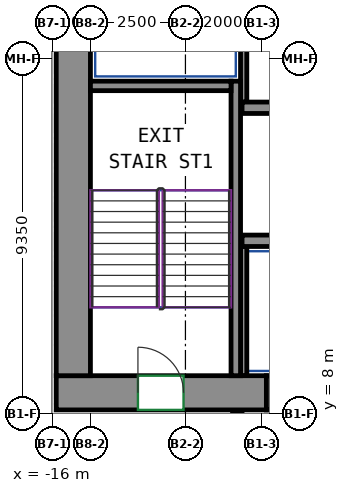
"""IFC4 building model, lengths in metres.
Left out: names, types, materials, properties, quantities, classifications, styles, units other than length and angle.
Written with IfcOpenShell. Run it as: python <this file> out.ifc"""

import sys

from ifc_helpers import new_model, si_unit, direction, frame, frame_2d, origin, place, context, subcontext, project, spatial, rectangle, extrude, source, transform, mapped, element, fill, save


model = new_model("IFC4")
c1 = context("Model", 3, precision=1e-05, world=origin(), true_north=direction((0.0, 1.0)))
c2 = subcontext(c1, "Body", "Model", "MODEL_VIEW")
j1 = project(units=[si_unit("LENGTHUNIT", "METRE"), si_unit("PLANEANGLEUNIT", "RADIAN")], contexts=[c1])
p1 = place(None, origin())
s1 = spatial("IfcSite", under=j1, at=p1, CompositionType="ELEMENT")
p2 = place(p1, origin())
s2 = spatial("IfcBuilding", under=s1, at=p2, CompositionType="ELEMENT")
p3 = place(p2, frame((0.0, 0.0, 120.6)))
s3 = spatial("IfcBuildingStorey", under=s2, at=p3, CompositionType="ELEMENT", Elevation=120.6)
m1 = source(origin(), c2, "Body", "SweptSolid", [
    extrude(rectangle(XDim=5.53, YDim=0.9, at=frame_2d((2.765, 0.0))), origin(), (0.0, 0.0, 1.0), 3.72),
])
p4 = place(p3, frame((-15.9, 8.55, 0.0), z_axis=(0.0, 0.0, 1.0), x_axis=(1.0, 0.0, 0.0)))
e1 = element("IfcWall", 1, at=p4, inside=s3, PredefinedType="SHEAR", context=c2, shape_type="MappedRepresentation", body=[
    mapped(m1, transform((0.0, 0.0, 0.0))),
])
p5 = place(p4, frame((2.15, 0.0, 0.0)))
e2 = element("IfcOpeningElement", 2, at=p5, cuts=e1, PredefinedType="OPENING", context=c2, shape_type="SweptSolid", body=[
    extrude(rectangle(XDim=1.2, YDim=2.1, at=frame_2d((0.6, 1.05))), frame((0.0, 0.46, 0.0), z_axis=(0.0, -1.0, 0.0), x_axis=(1.0, 0.0, 0.0)), (0.0, 0.0, 1.0), 0.92),
])
m2 = source(origin(), c2, "Body", "SweptSolid", [
    extrude(rectangle(XDim=12.0, YDim=0.9, at=frame_2d((6.0, 0.0))), origin(), (0.0, 0.0, 1.0), 3.72),
])
p6 = place(p3, frame((-15.45, 9.0, 0.0), z_axis=(0.0, 0.0, 1.0), x_axis=(0.0, 1.0, 0.0)))
e3 = element("IfcWall", 3, at=p6, inside=s3, PredefinedType="SHEAR", context=c2, shape_type="MappedRepresentation", body=[
    mapped(m2, transform((0.0, 0.0, 0.0))),
])
m3 = source(origin(), c2, "Body", "SweptSolid", [
    extrude(rectangle(XDim=7.75, YDim=0.25, at=frame_2d((3.875, 0.0))), origin(), (0.0, 0.0, 1.0), 3.72),
])
p7 = place(p3, frame((-11.175, 9.0, 0.0), z_axis=(0.0, 0.0, 1.0), x_axis=(0.0, 1.0, 0.0)))
e4 = element("IfcWall", 4, at=p7, inside=s3, PredefinedType="SHEAR", context=c2, shape_type="MappedRepresentation", body=[
    mapped(m3, transform((0.0, 0.0, 0.0))),
])
m4 = source(origin(), c2, "Body", "SweptSolid", [
    extrude(rectangle(XDim=3.7, YDim=0.25, at=frame_2d((1.85, 0.0))), origin(), (0.0, 0.0, 1.0), 3.72),
])
p8 = place(p3, frame((-15.0, 16.625, 0.0), z_axis=(0.0, 0.0, 1.0), x_axis=(1.0, 0.0, 0.0)))
e5 = element("IfcWall", 5, at=p8, inside=s3, PredefinedType="SHEAR", context=c2, shape_type="MappedRepresentation", body=[
    mapped(m4, transform((0.0, 0.0, 0.0))),
])
m5 = source(origin(), c2, "Body", "SweptSolid", [
    extrude(rectangle(XDim=6.0, YDim=0.3, at=frame_2d((3.0, 0.0))), origin(), (0.0, 0.0, 1.0), 3.72),
])
for number, where, z_axis, x_axis in (
    (6, (-11.01, 12.55, 0.0), (0.0, 0.0, 1.0), (1.0, 0.0, 0.0)),
    (7, (-11.01, 16.05, 0.0), (0.0, 0.0, 1.0), (1.0, 0.0, 0.0)),
):
    element("IfcWall", number, at=place(p3, frame(where, z_axis=z_axis, x_axis=x_axis)), inside=s3, PredefinedType="SHEAR", context=c2, shape_type="MappedRepresentation", body=[
        mapped(m5, transform((0.0, 0.0, 0.0))),
    ])
m6 = source(origin(), c2, "Body", "SweptSolid", [
    extrude(rectangle(XDim=4.8, YDim=0.165, at=frame_2d((2.4, 0.0))), origin(), (0.0, 0.0, 1.0), 3.72),
])
p9 = place(p3, frame((-10.968, 16.2, 0.0), z_axis=(0.0, 0.0, 1.0), x_axis=(0.0, 1.0, 0.0)))
e8 = element("IfcWall", 8, at=p9, inside=s3, PredefinedType="PARTITIONING", context=c2, shape_type="MappedRepresentation", body=[
    mapped(m6, transform((0.0, 0.0, 0.0))),
])
m7 = source(origin(), c2, "Body", "SweptSolid", [
    extrude(rectangle(XDim=3.4, YDim=0.165, at=frame_2d((1.7, 0.0))), origin(), (0.0, 0.0, 1.0), 3.72),
])
p10 = place(p3, frame((-10.968, 9.0, 0.0), z_axis=(0.0, 0.0, 1.0), x_axis=(0.0, 1.0, 0.0)))
e9 = element("IfcWall", 9, at=p10, inside=s3, PredefinedType="PARTITIONING", context=c2, shape_type="MappedRepresentation", body=[
    mapped(m7, transform((0.0, 0.0, 0.0))),
])
m8 = source(origin(), c2, "Body", "SweptSolid", [
    extrude(rectangle(XDim=1.4, YDim=0.9, at=frame_2d((0.7, 0.0))), origin(), (0.0, 0.0, 1.0), 2.7),
])
p11 = place(p3, frame((-10.37, 8.55, 0.0), z_axis=(0.0, 0.0, 1.0), x_axis=(1.0, 0.0, 0.0)))
e10 = element("IfcWall", 10, at=p11, inside=s3, PredefinedType="PARTITIONING", context=c2, shape_type="MappedRepresentation", body=[
    mapped(m8, transform((0.0, 0.0, 0.0))),
])
p12 = place(p11, frame((0.25, 0.0, 0.0)))
e11 = element("IfcOpeningElement", 11, at=p12, cuts=e10, PredefinedType="OPENING", context=c2, shape_type="SweptSolid", body=[
    extrude(rectangle(XDim=0.9, YDim=2.1, at=frame_2d((0.45, 1.05))), frame((0.0, 0.46, 0.0), z_axis=(0.0, -1.0, 0.0), x_axis=(1.0, 0.0, 0.0)), (0.0, 0.0, 1.0), 0.92),
])
p13 = place(p5, origin())
e12 = element("IfcDoor", 12, at=p13, inside=s3, OperationType="DOUBLE_DOOR_SINGLE_SWING", PredefinedType="DOOR", context=c2, shape_type="SweptSolid", body=[
    extrude(rectangle(XDim=1.2, YDim=2.1, at=frame_2d((0.6, 1.05))), frame((0.0, 0.355, 0.0), z_axis=(0.0, -1.0, 0.0), x_axis=(1.0, 0.0, 0.0)), (0.0, 0.0, 1.0), 0.05),
])
fill(e2, e12)
save(model, sys.argv[1])
